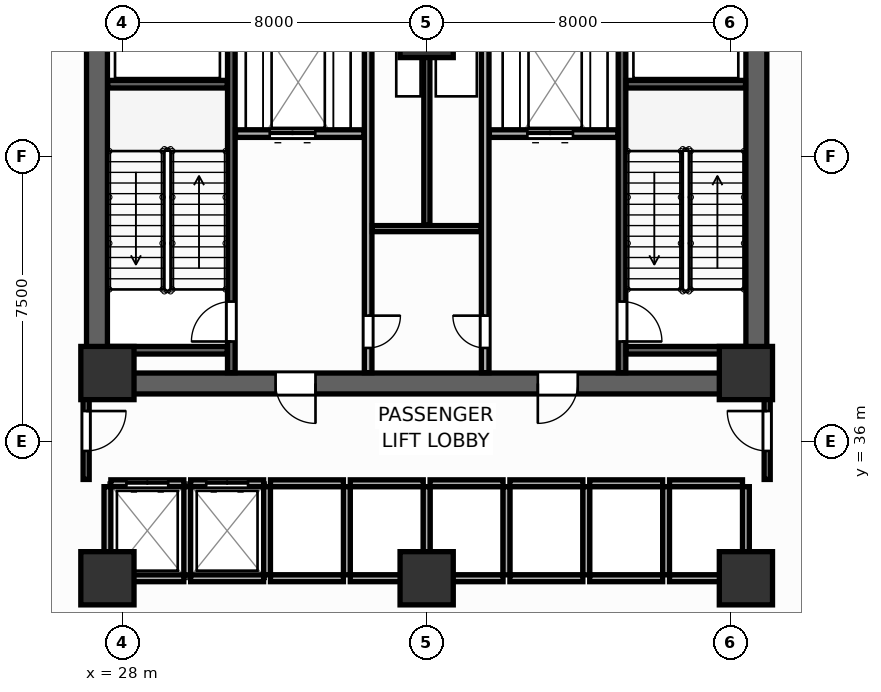
"""IFC4 building model, lengths in metres.
Left out: names, types, materials, properties, quantities, classifications, styles, units other than length and angle.
Written with IfcOpenShell. Run it as: python <this file> out.ifc"""

import sys

from ifc_helpers import new_model, si_unit, direction, frame, frame_2d, origin, origin_2d, place, context, subcontext, project, spatial, rectangle, extrude, source, transform, mapped, element, fill, save


model = new_model("IFC4")
c1 = context("Model", 3, precision=1e-05, world=origin(), true_north=direction((0.0, 1.0)))
c2 = subcontext(c1, "Body", "Model", "MODEL_VIEW")
j1 = project(units=[si_unit("LENGTHUNIT", "METRE"), si_unit("PLANEANGLEUNIT", "RADIAN")], contexts=[c1])
p1 = place(None, origin())
s1 = spatial("IfcSite", under=j1, at=p1, CompositionType="ELEMENT")
p2 = place(p1, origin())
s2 = spatial("IfcBuilding", under=s1, at=p2, CompositionType="ELEMENT")
p3 = place(p2, frame((0.0, 0.0, 9.6)))
s3 = spatial("IfcBuildingStorey", under=s2, at=p3, CompositionType="ELEMENT", Elevation=9.6)
p4 = place(p3, frame((27.05, 37.525, 0.0), z_axis=(0.0, 0.0, 1.0), x_axis=(1.0, 0.0, 0.0)))
e1 = element("IfcWall", 1, at=p4, inside=s3, PredefinedType="SHEAR", context=c2, shape_type="SweptSolid", body=[
    extrude(rectangle(XDim=17.9, YDim=0.55, at=frame_2d((8.95, 0.0))), origin(), (0.0, 0.0, 1.0), 4.8),
])
p5 = place(p4, frame((4.975, 0.0, 0.0)))
e2 = element("IfcOpeningElement", 2, at=p5, cuts=e1, PredefinedType="OPENING", context=c2, shape_type="SweptSolid", body=[
    extrude(rectangle(XDim=1.05, YDim=2.1, at=frame_2d((0.525, 1.05))), frame((0.0, 0.285, 0.0), z_axis=(0.0, -1.0, 0.0), x_axis=(1.0, 0.0, 0.0)), (0.0, 0.0, 1.0), 0.57),
])
p6 = place(p4, frame((11.875, 0.0, 0.0)))
e3 = element("IfcOpeningElement", 3, at=p6, cuts=e1, PredefinedType="OPENING", context=c2, shape_type="SweptSolid", body=[
    extrude(rectangle(XDim=1.05, YDim=2.1, at=frame_2d((0.525, 1.05))), frame((0.0, 0.285, 0.0), z_axis=(0.0, -1.0, 0.0), x_axis=(1.0, 0.0, 0.0)), (0.0, 0.0, 1.0), 0.57),
])
for number, where, z_axis, x_axis in (
    (4, (27.325, 37.8, 0.0), (0.0, 0.0, 1.0), (0.0, 1.0, 0.0)),
    (5, (44.675, 37.8, 0.0), (0.0, 0.0, 1.0), (0.0, 1.0, 0.0)),
):
    element("IfcWall", number, at=place(p3, frame(where, z_axis=z_axis, x_axis=x_axis)), inside=s3, PredefinedType="SHEAR", context=c2, shape_type="SweptSolid", body=[
        extrude(rectangle(XDim=9.0, YDim=0.55, at=frame_2d((4.5, 0.0))), origin(), (0.0, 0.0, 1.0), 4.8),
    ])
m1 = source(origin(), c2, "Body", "SweptSolid", [
    extrude(rectangle(XDim=1.4, YDim=1.4, at=origin_2d()), origin(), (0.0, 0.0, 1.0), 4.8),
])
for number, where, z_axis, x_axis in (
    (6, (27.6, 37.8, 0.0), (0.0, 0.0, 1.0), (1.0, 0.0, 0.0)),
    (7, (44.4, 37.8, 0.0), (0.0, 0.0, 1.0), (1.0, 0.0, 0.0)),
    (8, (27.6, 32.4, 0.0), (0.0, 0.0, 1.0), (1.0, 0.0, 0.0)),
    (9, (44.4, 32.4, 0.0), (0.0, 0.0, 1.0), (1.0, 0.0, 0.0)),
    (10, (36.0, 46.8, 0.0), (0.0, 0.0, 1.0), (1.0, 0.0, 0.0)),
    (11, (36.0, 32.4, 0.0), (0.0, 0.0, 1.0), (1.0, 0.0, 0.0)),
):
    element("IfcColumn", number, at=place(p3, frame(where, z_axis=z_axis, x_axis=x_axis)), inside=s3, PredefinedType="COLUMN", context=c2, shape_type="MappedRepresentation", body=[
        mapped(m1, transform((0.0, 0.0, 0.0), scale=1.0)),
    ])
p7 = place(p3, frame((30.86, 37.81, 0.0), z_axis=(0.0, 0.0, 1.0), x_axis=(0.0, 1.0, 0.0)))
e12 = element("IfcWall", 12, at=p7, inside=s3, PredefinedType="SHEAR", context=c2, shape_type="SweptSolid", body=[
    extrude(rectangle(XDim=8.98, YDim=0.2, at=frame_2d((4.49, 0.0))), origin(), (0.0, 0.0, 1.0), 4.8),
])
p8 = place(p7, frame((0.82, 0.0, 0.0)))
e13 = element("IfcOpeningElement", 13, at=p8, cuts=e12, PredefinedType="OPENING", context=c2, shape_type="SweptSolid", body=[
    extrude(rectangle(XDim=1.05, YDim=2.1, at=frame_2d((0.525, 1.05))), frame((0.0, 0.11, 0.0), z_axis=(0.0, -1.0, 0.0), x_axis=(1.0, 0.0, 0.0)), (0.0, 0.0, 1.0), 0.22),
])
for number, where, z_axis, x_axis in (
    (14, (27.61, 45.4, 0.0), (0.0, 0.0, 1.0), (1.0, 0.0, 0.0)),
    (15, (27.61, 38.4, 0.0), (0.0, 0.0, 1.0), (1.0, 0.0, 0.0)),
):
    element("IfcWall", number, at=place(p3, frame(where, z_axis=z_axis, x_axis=x_axis)), inside=s3, PredefinedType="SHEAR", context=c2, shape_type="SweptSolid", body=[
        extrude(rectangle(XDim=3.14, YDim=0.2, at=frame_2d((1.57, 0.0))), origin(), (0.0, 0.0, 1.0), 4.8),
    ])
p9 = place(p3, frame((41.14, 37.81, 0.0), z_axis=(0.0, 0.0, 1.0), x_axis=(0.0, 1.0, 0.0)))
e16 = element("IfcWall", 16, at=p9, inside=s3, PredefinedType="SHEAR", context=c2, shape_type="SweptSolid", body=[
    extrude(rectangle(XDim=8.98, YDim=0.2, at=frame_2d((4.49, 0.0))), origin(), (0.0, 0.0, 1.0), 4.8),
])
p10 = place(p9, frame((0.82, 0.0, 0.0)))
e17 = element("IfcOpeningElement", 17, at=p10, cuts=e16, PredefinedType="OPENING", context=c2, shape_type="SweptSolid", body=[
    extrude(rectangle(XDim=1.05, YDim=2.1, at=frame_2d((0.525, 1.05))), frame((0.0, 0.11, 0.0), z_axis=(0.0, -1.0, 0.0), x_axis=(1.0, 0.0, 0.0)), (0.0, 0.0, 1.0), 0.22),
])
for number, where, z_axis, x_axis in (
    (18, (41.25, 45.4, 0.0), (0.0, 0.0, 1.0), (1.0, 0.0, 0.0)),
    (19, (41.25, 38.4, 0.0), (0.0, 0.0, 1.0), (1.0, 0.0, 0.0)),
):
    element("IfcWall", number, at=place(p3, frame(where, z_axis=z_axis, x_axis=x_axis)), inside=s3, PredefinedType="SHEAR", context=c2, shape_type="SweptSolid", body=[
        extrude(rectangle(XDim=3.14, YDim=0.2, at=frame_2d((1.57, 0.0))), origin(), (0.0, 0.0, 1.0), 4.8),
    ])
p11 = place(p3, frame((30.97, 44.1, 0.0), z_axis=(0.0, 0.0, 1.0), x_axis=(1.0, 0.0, 0.0)))
e20 = element("IfcWall", 20, at=p11, inside=s3, PredefinedType="PARTITIONING", context=c2, shape_type="SweptSolid", body=[
    extrude(rectangle(XDim=3.38, YDim=0.2, at=frame_2d((1.69, 0.0))), origin(), (0.0, 0.0, 1.0), 4.35),
])
p12 = place(p11, frame((0.9, 0.0, 0.0)))
e21 = element("IfcOpeningElement", 21, at=p12, cuts=e20, PredefinedType="OPENING", context=c2, shape_type="SweptSolid", body=[
    extrude(rectangle(XDim=1.2, YDim=2.1, at=frame_2d((0.6, 1.05))), frame((0.0, 0.11, 0.0), z_axis=(0.0, -1.0, 0.0), x_axis=(1.0, 0.0, 0.0)), (0.0, 0.0, 1.0), 0.22),
])
p13 = place(p3, frame((37.65, 44.1, 0.0), z_axis=(0.0, 0.0, 1.0), x_axis=(1.0, 0.0, 0.0)))
e22 = element("IfcWall", 22, at=p13, inside=s3, PredefinedType="PARTITIONING", context=c2, shape_type="SweptSolid", body=[
    extrude(rectangle(XDim=3.38, YDim=0.2, at=frame_2d((1.69, 0.0))), origin(), (0.0, 0.0, 1.0), 4.35),
])
p14 = place(p13, frame((1.0, 0.0, 0.0)))
e23 = element("IfcOpeningElement", 23, at=p14, cuts=e22, PredefinedType="OPENING", context=c2, shape_type="SweptSolid", body=[
    extrude(rectangle(XDim=1.2, YDim=2.1, at=frame_2d((0.6, 1.05))), frame((0.0, 0.11, 0.0), z_axis=(0.0, -1.0, 0.0), x_axis=(1.0, 0.0, 0.0)), (0.0, 0.0, 1.0), 0.22),
])
p15 = place(p3, frame((34.46, 37.81, 0.0), z_axis=(0.0, 0.0, 1.0), x_axis=(0.0, 1.0, 0.0)))
e24 = element("IfcWall", 24, at=p15, inside=s3, PredefinedType="PARTITIONING", context=c2, shape_type="SweptSolid", body=[
    extrude(rectangle(XDim=8.98, YDim=0.2, at=frame_2d((4.49, 0.0))), origin(), (0.0, 0.0, 1.0), 4.35),
])
p16 = place(p15, frame((0.65, 0.0, 0.0)))
e25 = element("IfcOpeningElement", 25, at=p16, cuts=e24, PredefinedType="OPENING", context=c2, shape_type="SweptSolid", body=[
    extrude(rectangle(XDim=0.85, YDim=2.05, at=frame_2d((0.425, 1.025))), frame((0.0, 0.11, 0.0), z_axis=(0.0, -1.0, 0.0), x_axis=(1.0, 0.0, 0.0)), (0.0, 0.0, 1.0), 0.22),
])
p17 = place(p3, frame((37.54, 37.81, 0.0), z_axis=(0.0, 0.0, 1.0), x_axis=(0.0, 1.0, 0.0)))
e26 = element("IfcWall", 26, at=p17, inside=s3, PredefinedType="PARTITIONING", context=c2, shape_type="SweptSolid", body=[
    extrude(rectangle(XDim=8.98, YDim=0.2, at=frame_2d((4.49, 0.0))), origin(), (0.0, 0.0, 1.0), 4.35),
])
p18 = place(p17, frame((0.65, 0.0, 0.0)))
e27 = element("IfcOpeningElement", 27, at=p18, cuts=e26, PredefinedType="OPENING", context=c2, shape_type="SweptSolid", body=[
    extrude(rectangle(XDim=0.85, YDim=2.05, at=frame_2d((0.425, 1.025))), frame((0.0, 0.11, 0.0), z_axis=(0.0, -1.0, 0.0), x_axis=(1.0, 0.0, 0.0)), (0.0, 0.0, 1.0), 0.22),
])
p19 = place(p3, frame((34.57, 41.6, 0.0), z_axis=(0.0, 0.0, 1.0), x_axis=(1.0, 0.0, 0.0)))
e28 = element("IfcWall", 28, at=p19, inside=s3, PredefinedType="PARTITIONING", context=c2, shape_type="SweptSolid", body=[
    extrude(rectangle(XDim=2.86, YDim=0.16, at=frame_2d((1.43, 0.0))), origin(), (0.0, 0.0, 1.0), 4.35),
])
p20 = place(p3, frame((36.005, 41.69, 0.0), z_axis=(0.0, 0.0, 1.0), x_axis=(0.0, 1.0, 0.0)))
e29 = element("IfcWall", 29, at=p20, inside=s3, PredefinedType="PARTITIONING", context=c2, shape_type="SweptSolid", body=[
    extrude(rectangle(XDim=5.1, YDim=0.16, at=frame_2d((2.55, 0.0))), origin(), (0.0, 0.0, 1.0), 4.35),
])
p21 = place(p3, frame((27.69, 34.9, 0.0), z_axis=(0.0, 0.0, 1.0), x_axis=(1.0, 0.0, 0.0)))
e30 = element("IfcWall", 30, at=p21, inside=s3, PredefinedType="PARTITIONING", context=c2, shape_type="SweptSolid", body=[
    extrude(rectangle(XDim=1.92, YDim=0.18, at=frame_2d((0.96, 0.0))), origin(), (0.0, 0.0, 1.0), 4.35),
])
p22 = place(p21, frame((0.41, 0.0, 0.0)))
e31 = element("IfcOpeningElement", 31, at=p22, cuts=e30, PredefinedType="OPENING", context=c2, shape_type="SweptSolid", body=[
    extrude(rectangle(XDim=1.1, YDim=2.1, at=frame_2d((0.55, 1.05))), frame((0.0, 0.1, 0.0), z_axis=(0.0, -1.0, 0.0), x_axis=(1.0, 0.0, 0.0)), (0.0, 0.0, 1.0), 0.2),
])
p23 = place(p3, frame((27.69, 32.4, 0.0), z_axis=(0.0, 0.0, 1.0), x_axis=(1.0, 0.0, 0.0)))
e32 = element("IfcWall", 32, at=p23, inside=s3, PredefinedType="PARTITIONING", context=c2, shape_type="SweptSolid", body=[
    extrude(rectangle(XDim=1.92, YDim=0.18, at=frame_2d((0.96, 0.0))), origin(), (0.0, 0.0, 1.0), 4.35),
])
p24 = place(p3, frame((27.6, 32.49, 0.0), z_axis=(0.0, 0.0, 1.0), x_axis=(0.0, 1.0, 0.0)))
e33 = element("IfcWall", 33, at=p24, inside=s3, PredefinedType="PARTITIONING", context=c2, shape_type="SweptSolid", body=[
    extrude(rectangle(XDim=2.32, YDim=0.18, at=frame_2d((1.16, 0.0))), origin(), (0.0, 0.0, 1.0), 4.35),
])
p25 = place(p3, frame((29.79, 34.9, 0.0), z_axis=(0.0, 0.0, 1.0), x_axis=(1.0, 0.0, 0.0)))
e34 = element("IfcWall", 34, at=p25, inside=s3, PredefinedType="PARTITIONING", context=c2, shape_type="SweptSolid", body=[
    extrude(rectangle(XDim=1.92, YDim=0.18, at=frame_2d((0.96, 0.0))), origin(), (0.0, 0.0, 1.0), 4.35),
])
p26 = place(p25, frame((0.41, 0.0, 0.0)))
e35 = element("IfcOpeningElement", 35, at=p26, cuts=e34, PredefinedType="OPENING", context=c2, shape_type="SweptSolid", body=[
    extrude(rectangle(XDim=1.1, YDim=2.1, at=frame_2d((0.55, 1.05))), frame((0.0, 0.1, 0.0), z_axis=(0.0, -1.0, 0.0), x_axis=(1.0, 0.0, 0.0)), (0.0, 0.0, 1.0), 0.2),
])
p27 = place(p3, frame((29.79, 32.4, 0.0), z_axis=(0.0, 0.0, 1.0), x_axis=(1.0, 0.0, 0.0)))
e36 = element("IfcWall", 36, at=p27, inside=s3, PredefinedType="PARTITIONING", context=c2, shape_type="SweptSolid", body=[
    extrude(rectangle(XDim=1.92, YDim=0.18, at=frame_2d((0.96, 0.0))), origin(), (0.0, 0.0, 1.0), 4.35),
])
p28 = place(p3, frame((29.7, 32.49, 0.0), z_axis=(0.0, 0.0, 1.0), x_axis=(0.0, 1.0, 0.0)))
e37 = element("IfcWall", 37, at=p28, inside=s3, PredefinedType="PARTITIONING", context=c2, shape_type="SweptSolid", body=[
    extrude(rectangle(XDim=2.32, YDim=0.18, at=frame_2d((1.16, 0.0))), origin(), (0.0, 0.0, 1.0), 4.35),
])
for number, where, z_axis, x_axis in (
    (38, (31.89, 34.9, 0.0), (0.0, 0.0, 1.0), (1.0, 0.0, 0.0)),
    (39, (31.89, 32.4, 0.0), (0.0, 0.0, 1.0), (1.0, 0.0, 0.0)),
):
    element("IfcWall", number, at=place(p3, frame(where, z_axis=z_axis, x_axis=x_axis)), inside=s3, PredefinedType="PARTITIONING", context=c2, shape_type="SweptSolid", body=[
        extrude(rectangle(XDim=1.92, YDim=0.18, at=frame_2d((0.96, 0.0))), origin(), (0.0, 0.0, 1.0), 4.35),
    ])
p29 = place(p3, frame((31.8, 32.49, 0.0), z_axis=(0.0, 0.0, 1.0), x_axis=(0.0, 1.0, 0.0)))
e40 = element("IfcWall", 40, at=p29, inside=s3, PredefinedType="PARTITIONING", context=c2, shape_type="SweptSolid", body=[
    extrude(rectangle(XDim=2.32, YDim=0.18, at=frame_2d((1.16, 0.0))), origin(), (0.0, 0.0, 1.0), 4.35),
])
for number, where, z_axis, x_axis in (
    (41, (33.99, 34.9, 0.0), (0.0, 0.0, 1.0), (1.0, 0.0, 0.0)),
    (42, (33.99, 32.4, 0.0), (0.0, 0.0, 1.0), (1.0, 0.0, 0.0)),
):
    element("IfcWall", number, at=place(p3, frame(where, z_axis=z_axis, x_axis=x_axis)), inside=s3, PredefinedType="PARTITIONING", context=c2, shape_type="SweptSolid", body=[
        extrude(rectangle(XDim=1.92, YDim=0.18, at=frame_2d((0.96, 0.0))), origin(), (0.0, 0.0, 1.0), 4.35),
    ])
p30 = place(p3, frame((33.9, 32.49, 0.0), z_axis=(0.0, 0.0, 1.0), x_axis=(0.0, 1.0, 0.0)))
e43 = element("IfcWall", 43, at=p30, inside=s3, PredefinedType="PARTITIONING", context=c2, shape_type="SweptSolid", body=[
    extrude(rectangle(XDim=2.32, YDim=0.18, at=frame_2d((1.16, 0.0))), origin(), (0.0, 0.0, 1.0), 4.35),
])
for number, where, z_axis, x_axis in (
    (44, (36.09, 34.9, 0.0), (0.0, 0.0, 1.0), (1.0, 0.0, 0.0)),
    (45, (36.09, 32.4, 0.0), (0.0, 0.0, 1.0), (1.0, 0.0, 0.0)),
):
    element("IfcWall", number, at=place(p3, frame(where, z_axis=z_axis, x_axis=x_axis)), inside=s3, PredefinedType="PARTITIONING", context=c2, shape_type="SweptSolid", body=[
        extrude(rectangle(XDim=1.92, YDim=0.18, at=frame_2d((0.96, 0.0))), origin(), (0.0, 0.0, 1.0), 4.35),
    ])
p31 = place(p3, frame((36.0, 32.49, 0.0), z_axis=(0.0, 0.0, 1.0), x_axis=(0.0, 1.0, 0.0)))
e46 = element("IfcWall", 46, at=p31, inside=s3, PredefinedType="PARTITIONING", context=c2, shape_type="SweptSolid", body=[
    extrude(rectangle(XDim=2.32, YDim=0.18, at=frame_2d((1.16, 0.0))), origin(), (0.0, 0.0, 1.0), 4.35),
])
for number, where, z_axis, x_axis in (
    (47, (38.19, 34.9, 0.0), (0.0, 0.0, 1.0), (1.0, 0.0, 0.0)),
    (48, (38.19, 32.4, 0.0), (0.0, 0.0, 1.0), (1.0, 0.0, 0.0)),
):
    element("IfcWall", number, at=place(p3, frame(where, z_axis=z_axis, x_axis=x_axis)), inside=s3, PredefinedType="PARTITIONING", context=c2, shape_type="SweptSolid", body=[
        extrude(rectangle(XDim=1.92, YDim=0.18, at=frame_2d((0.96, 0.0))), origin(), (0.0, 0.0, 1.0), 4.35),
    ])
p32 = place(p3, frame((38.1, 32.49, 0.0), z_axis=(0.0, 0.0, 1.0), x_axis=(0.0, 1.0, 0.0)))
e49 = element("IfcWall", 49, at=p32, inside=s3, PredefinedType="PARTITIONING", context=c2, shape_type="SweptSolid", body=[
    extrude(rectangle(XDim=2.32, YDim=0.18, at=frame_2d((1.16, 0.0))), origin(), (0.0, 0.0, 1.0), 4.35),
])
for number, where, z_axis, x_axis in (
    (50, (40.29, 34.9, 0.0), (0.0, 0.0, 1.0), (1.0, 0.0, 0.0)),
    (51, (40.29, 32.4, 0.0), (0.0, 0.0, 1.0), (1.0, 0.0, 0.0)),
):
    element("IfcWall", number, at=place(p3, frame(where, z_axis=z_axis, x_axis=x_axis)), inside=s3, PredefinedType="PARTITIONING", context=c2, shape_type="SweptSolid", body=[
        extrude(rectangle(XDim=1.92, YDim=0.18, at=frame_2d((0.96, 0.0))), origin(), (0.0, 0.0, 1.0), 4.35),
    ])
p33 = place(p3, frame((40.2, 32.49, 0.0), z_axis=(0.0, 0.0, 1.0), x_axis=(0.0, 1.0, 0.0)))
e52 = element("IfcWall", 52, at=p33, inside=s3, PredefinedType="PARTITIONING", context=c2, shape_type="SweptSolid", body=[
    extrude(rectangle(XDim=2.32, YDim=0.18, at=frame_2d((1.16, 0.0))), origin(), (0.0, 0.0, 1.0), 4.35),
])
for number, where, z_axis, x_axis in (
    (53, (42.39, 34.9, 0.0), (0.0, 0.0, 1.0), (1.0, 0.0, 0.0)),
    (54, (42.39, 32.4, 0.0), (0.0, 0.0, 1.0), (1.0, 0.0, 0.0)),
):
    element("IfcWall", number, at=place(p3, frame(where, z_axis=z_axis, x_axis=x_axis)), inside=s3, PredefinedType="PARTITIONING", context=c2, shape_type="SweptSolid", body=[
        extrude(rectangle(XDim=1.92, YDim=0.18, at=frame_2d((0.96, 0.0))), origin(), (0.0, 0.0, 1.0), 4.35),
    ])
for number, where, z_axis, x_axis in (
    (55, (42.3, 32.49, 0.0), (0.0, 0.0, 1.0), (0.0, 1.0, 0.0)),
    (56, (44.4, 32.49, 0.0), (0.0, 0.0, 1.0), (0.0, 1.0, 0.0)),
):
    element("IfcWall", number, at=place(p3, frame(where, z_axis=z_axis, x_axis=x_axis)), inside=s3, PredefinedType="PARTITIONING", context=c2, shape_type="SweptSolid", body=[
        extrude(rectangle(XDim=2.32, YDim=0.18, at=frame_2d((1.16, 0.0))), origin(), (0.0, 0.0, 1.0), 4.35),
    ])
p34 = place(p3, frame((27.04, 35.0, 0.0), z_axis=(0.0, 0.0, 1.0), x_axis=(0.0, 1.0, 0.0)))
e57 = element("IfcWall", 57, at=p34, inside=s3, PredefinedType="PARTITIONING", context=c2, shape_type="SweptSolid", body=[
    extrude(rectangle(XDim=2.65, YDim=0.16, at=frame_2d((1.325, 0.0))), origin(), (0.0, 0.0, 1.0), 4.35),
])
p35 = place(p34, frame((0.75, 0.0, 0.0)))
e58 = element("IfcOpeningElement", 58, at=p35, cuts=e57, PredefinedType="OPENING", context=c2, shape_type="SweptSolid", body=[
    extrude(rectangle(XDim=1.05, YDim=2.1, at=frame_2d((0.525, 1.05))), frame((0.0, 0.09, 0.0), z_axis=(0.0, -1.0, 0.0), x_axis=(1.0, 0.0, 0.0)), (0.0, 0.0, 1.0), 0.18),
])
p36 = place(p3, frame((44.96, 35.0, 0.0), z_axis=(0.0, 0.0, 1.0), x_axis=(0.0, 1.0, 0.0)))
e59 = element("IfcWall", 59, at=p36, inside=s3, PredefinedType="PARTITIONING", context=c2, shape_type="SweptSolid", body=[
    extrude(rectangle(XDim=2.65, YDim=0.16, at=frame_2d((1.325, 0.0))), origin(), (0.0, 0.0, 1.0), 4.35),
])
p37 = place(p36, frame((0.75, 0.0, 0.0)))
e60 = element("IfcOpeningElement", 60, at=p37, cuts=e59, PredefinedType="OPENING", context=c2, shape_type="SweptSolid", body=[
    extrude(rectangle(XDim=1.05, YDim=2.1, at=frame_2d((0.525, 1.05))), frame((0.0, 0.09, 0.0), z_axis=(0.0, -1.0, 0.0), x_axis=(1.0, 0.0, 0.0)), (0.0, 0.0, 1.0), 0.18),
])
p38 = place(p8, origin())
e61 = element("IfcDoor", 61, at=p38, inside=s3, OperationType="SINGLE_SWING_LEFT", PredefinedType="DOOR", context=c2, shape_type="SweptSolid", body=[
    extrude(rectangle(XDim=1.05, YDim=2.1, at=frame_2d((0.525, 1.05))), frame((0.0, 0.025, 0.0), z_axis=(0.0, -1.0, 0.0), x_axis=(1.0, 0.0, 0.0)), (0.0, 0.0, 1.0), 0.05),
])
fill(e13, e61)
p39 = place(p10, frame((1.05, 0.0, 0.0), z_axis=(0.0, 0.0, 1.0), x_axis=(-1.0, 0.0, 0.0)))
e62 = element("IfcDoor", 62, at=p39, inside=s3, OperationType="SINGLE_SWING_RIGHT", PredefinedType="DOOR", context=c2, shape_type="SweptSolid", body=[
    extrude(rectangle(XDim=1.05, YDim=2.1, at=frame_2d((0.525, 1.05))), frame((0.0, 0.025, 0.0), z_axis=(0.0, -1.0, 0.0), x_axis=(1.0, 0.0, 0.0)), (0.0, 0.0, 1.0), 0.05),
])
fill(e17, e62)
p40 = place(p12, origin())
e63 = element("IfcDoor", 63, at=p40, inside=s3, OperationType="DOUBLE_DOOR_SLIDING", PredefinedType="DOOR", context=c2, shape_type="SweptSolid", body=[
    extrude(rectangle(XDim=1.2, YDim=2.1, at=frame_2d((0.6, 1.05))), frame((0.0, 0.025, 0.0), z_axis=(0.0, -1.0, 0.0), x_axis=(1.0, 0.0, 0.0)), (0.0, 0.0, 1.0), 0.05),
])
fill(e21, e63)
p41 = place(p14, origin())
e64 = element("IfcDoor", 64, at=p41, inside=s3, OperationType="DOUBLE_DOOR_SLIDING", PredefinedType="DOOR", context=c2, shape_type="SweptSolid", body=[
    extrude(rectangle(XDim=1.2, YDim=2.1, at=frame_2d((0.6, 1.05))), frame((0.0, 0.025, 0.0), z_axis=(0.0, -1.0, 0.0), x_axis=(1.0, 0.0, 0.0)), (0.0, 0.0, 1.0), 0.05),
])
fill(e23, e64)
p42 = place(p16, frame((0.85, 0.0, 0.0), z_axis=(0.0, 0.0, 1.0), x_axis=(-1.0, 0.0, 0.0)))
e65 = element("IfcDoor", 65, at=p42, inside=s3, OperationType="SINGLE_SWING_LEFT", PredefinedType="DOOR", context=c2, shape_type="SweptSolid", body=[
    extrude(rectangle(XDim=0.85, YDim=2.05, at=frame_2d((0.425, 1.025))), frame((0.0, 0.025, 0.0), z_axis=(0.0, -1.0, 0.0), x_axis=(1.0, 0.0, 0.0)), (0.0, 0.0, 1.0), 0.05),
])
fill(e25, e65)
p43 = place(p18, origin())
e66 = element("IfcDoor", 66, at=p43, inside=s3, OperationType="SINGLE_SWING_RIGHT", PredefinedType="DOOR", context=c2, shape_type="SweptSolid", body=[
    extrude(rectangle(XDim=0.85, YDim=2.05, at=frame_2d((0.425, 1.025))), frame((0.0, 0.025, 0.0), z_axis=(0.0, -1.0, 0.0), x_axis=(1.0, 0.0, 0.0)), (0.0, 0.0, 1.0), 0.05),
])
fill(e27, e66)
p44 = place(p22, origin())
e67 = element("IfcDoor", 67, at=p44, inside=s3, OperationType="DOUBLE_DOOR_SLIDING", PredefinedType="DOOR", context=c2, shape_type="SweptSolid", body=[
    extrude(rectangle(XDim=1.1, YDim=2.1, at=frame_2d((0.55, 1.05))), frame((0.0, 0.025, 0.0), z_axis=(0.0, -1.0, 0.0), x_axis=(1.0, 0.0, 0.0)), (0.0, 0.0, 1.0), 0.05),
])
fill(e31, e67)
p45 = place(p26, origin())
e68 = element("IfcDoor", 68, at=p45, inside=s3, OperationType="DOUBLE_DOOR_SLIDING", PredefinedType="DOOR", context=c2, shape_type="SweptSolid", body=[
    extrude(rectangle(XDim=1.1, YDim=2.1, at=frame_2d((0.55, 1.05))), frame((0.0, 0.025, 0.0), z_axis=(0.0, -1.0, 0.0), x_axis=(1.0, 0.0, 0.0)), (0.0, 0.0, 1.0), 0.05),
])
fill(e35, e68)
p46 = place(p35, frame((1.05, 0.0, 0.0), z_axis=(0.0, 0.0, 1.0), x_axis=(-1.0, 0.0, 0.0)))
e69 = element("IfcDoor", 69, at=p46, inside=s3, OperationType="SINGLE_SWING_LEFT", PredefinedType="DOOR", context=c2, shape_type="SweptSolid", body=[
    extrude(rectangle(XDim=1.05, YDim=2.1, at=frame_2d((0.525, 1.05))), frame((0.0, 0.025, 0.0), z_axis=(0.0, -1.0, 0.0), x_axis=(1.0, 0.0, 0.0)), (0.0, 0.0, 1.0), 0.05),
])
fill(e58, e69)
p47 = place(p37, origin())
e70 = element("IfcDoor", 70, at=p47, inside=s3, OperationType="SINGLE_SWING_RIGHT", PredefinedType="DOOR", context=c2, shape_type="SweptSolid", body=[
    extrude(rectangle(XDim=1.05, YDim=2.1, at=frame_2d((0.525, 1.05))), frame((0.0, 0.025, 0.0), z_axis=(0.0, -1.0, 0.0), x_axis=(1.0, 0.0, 0.0)), (0.0, 0.0, 1.0), 0.05),
])
fill(e60, e70)
p48 = place(p5, frame((1.05, 0.0, 0.0), z_axis=(0.0, 0.0, 1.0), x_axis=(-1.0, 0.0, 0.0)))
e71 = element("IfcDoor", 71, at=p48, inside=s3, OperationType="SINGLE_SWING_LEFT", PredefinedType="DOOR", context=c2, shape_type="SweptSolid", body=[
    extrude(rectangle(XDim=1.05, YDim=2.1, at=frame_2d((0.525, 1.05))), frame((0.0, 0.025, 0.0), z_axis=(0.0, -1.0, 0.0), x_axis=(1.0, 0.0, 0.0)), (0.0, 0.0, 1.0), 0.05),
])
fill(e2, e71)
p49 = place(p6, frame((1.05, 0.0, 0.0), z_axis=(0.0, 0.0, 1.0), x_axis=(-1.0, 0.0, 0.0)))
e72 = element("IfcDoor", 72, at=p49, inside=s3, OperationType="SINGLE_SWING_RIGHT", PredefinedType="DOOR", context=c2, shape_type="SweptSolid", body=[
    extrude(rectangle(XDim=1.05, YDim=2.1, at=frame_2d((0.525, 1.05))), frame((0.0, 0.025, 0.0), z_axis=(0.0, -1.0, 0.0), x_axis=(1.0, 0.0, 0.0)), (0.0, 0.0, 1.0), 0.05),
])
fill(e3, e72)
save(model, sys.argv[1])
